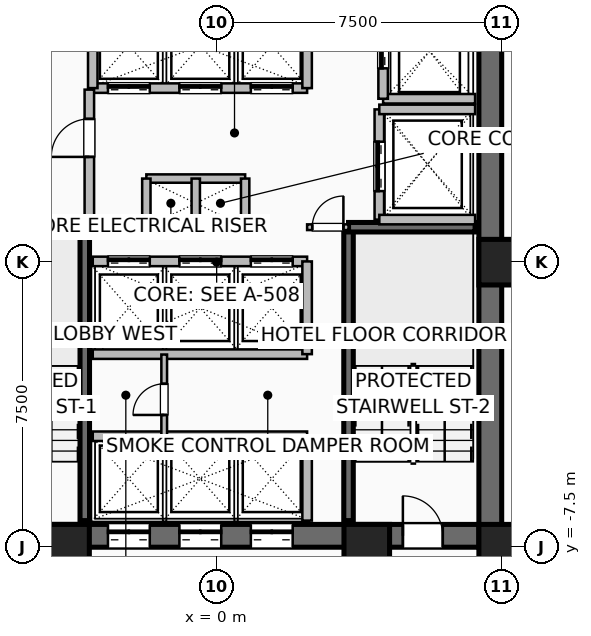
"""IFC4 building model, lengths in metres.
Left out: names, types, materials, properties, quantities, classifications, styles, units other than length and angle.
Written with IfcOpenShell. Run it as: python <this file> out.ifc"""

import sys

from ifc_helpers import new_model, si_unit, direction, frame, frame_2d, origin, origin_2d, place, context, subcontext, project, spatial, rectangle, hollow_rectangle, extrude, element, fill, save


model = new_model("IFC4")
c1 = context("Model", 3, precision=1e-05, world=origin(), true_north=direction((0.0, 1.0)))
c2 = subcontext(c1, "Body", "Model", "MODEL_VIEW")
j1 = project(units=[si_unit("LENGTHUNIT", "METRE"), si_unit("PLANEANGLEUNIT", "RADIAN")], contexts=[c1])
p1 = place(None, origin())
s1 = spatial("IfcSite", under=j1, at=p1, CompositionType="ELEMENT")
p2 = place(p1, origin())
s2 = spatial("IfcBuilding", under=s1, at=p2, CompositionType="ELEMENT")
p3 = place(p2, frame((0.0, 0.0, 27.0)))
s3 = spatial("IfcBuildingStorey", under=s2, at=p3, CompositionType="ELEMENT", Elevation=27.0)
for number, where, z_axis, x_axis in (
    (1, (-3.95, -7.5, 0.0), (0.0, 0.0, 1.0), (1.0, 0.0, 0.0)),
    (2, (3.95, -7.5, 0.0), (0.0, 0.0, 1.0), (1.0, 0.0, 0.0)),
    (3, (7.5, -7.5, 0.0), (0.0, 0.0, 1.0), (1.0, 0.0, 0.0)),
    (4, (7.5, 0.0, 0.0), (0.0, 0.0, 1.0), (1.0, 0.0, 0.0)),
):
    element("IfcColumn", number, at=place(p3, frame(where, z_axis=z_axis, x_axis=x_axis)), inside=s3, PredefinedType="COLUMN", context=c2, shape_type="SweptSolid", body=[
        extrude(hollow_rectangle(XDim=1.2, YDim=1.2, WallThickness=0.055, at=origin_2d()), origin(), (0.0, 0.0, 1.0), 3.5),
    ])
p4 = place(p3, frame((-7.5, -7.2, 0.0), z_axis=(0.0, 0.0, 1.0), x_axis=(1.0, 0.0, 0.0)))
e5 = element("IfcWall", 5, at=p4, inside=s3, PredefinedType="SHEAR", context=c2, shape_type="SweptSolid", body=[
    extrude(rectangle(XDim=15.0, YDim=0.6, at=frame_2d((7.5, 0.0))), origin(), (0.0, 0.0, 1.0), 3.25),
])
p5 = place(p4, frame((1.55, 0.0, 0.0)))
e6 = element("IfcOpeningElement", 6, at=p5, cuts=e5, PredefinedType="OPENING", context=c2, shape_type="SweptSolid", body=[
    extrude(rectangle(XDim=1.05, YDim=2.08, at=frame_2d((0.525, 1.04))), frame((0.0, 0.31, 0.0), z_axis=(0.0, -1.0, 0.0), x_axis=(1.0, 0.0, 0.0)), (0.0, 0.0, 1.0), 0.62),
])
p6 = place(p4, frame((12.4, 0.0, 0.0)))
e7 = element("IfcOpeningElement", 7, at=p6, cuts=e5, PredefinedType="OPENING", context=c2, shape_type="SweptSolid", body=[
    extrude(rectangle(XDim=1.05, YDim=2.08, at=frame_2d((0.525, 1.04))), frame((0.0, 0.31, 0.0), z_axis=(0.0, -1.0, 0.0), x_axis=(1.0, 0.0, 0.0)), (0.0, 0.0, 1.0), 0.62),
])
p7 = place(p4, frame((4.64, 0.0, 0.0)))
e8 = element("IfcOpeningElement", 8, at=p7, cuts=e5, PredefinedType="OPENING", context=c2, shape_type="SweptSolid", body=[
    extrude(rectangle(XDim=1.1, YDim=2.2, at=frame_2d((0.55, 1.1))), frame((0.0, 0.31, 0.0), z_axis=(0.0, -1.0, 0.0), x_axis=(1.0, 0.0, 0.0)), (0.0, 0.0, 1.0), 0.62),
])
p8 = place(p4, frame((6.52, 0.0, 0.0)))
e9 = element("IfcOpeningElement", 9, at=p8, cuts=e5, PredefinedType="OPENING", context=c2, shape_type="SweptSolid", body=[
    extrude(rectangle(XDim=1.1, YDim=2.2, at=frame_2d((0.55, 1.1))), frame((0.0, 0.31, 0.0), z_axis=(0.0, -1.0, 0.0), x_axis=(1.0, 0.0, 0.0)), (0.0, 0.0, 1.0), 0.62),
])
p9 = place(p4, frame((8.4, 0.0, 0.0)))
e10 = element("IfcOpeningElement", 10, at=p9, cuts=e5, PredefinedType="OPENING", context=c2, shape_type="SweptSolid", body=[
    extrude(rectangle(XDim=1.1, YDim=2.2, at=frame_2d((0.55, 1.1))), frame((0.0, 0.31, 0.0), z_axis=(0.0, -1.0, 0.0), x_axis=(1.0, 0.0, 0.0)), (0.0, 0.0, 1.0), 0.62),
])
p10 = place(p3, frame((7.2, -7.5, 0.0), z_axis=(0.0, 0.0, 1.0), x_axis=(0.0, 1.0, 0.0)))
e11 = element("IfcWall", 11, at=p10, inside=s3, PredefinedType="SHEAR", context=c2, shape_type="SweptSolid", body=[
    extrude(rectangle(XDim=15.0, YDim=0.6, at=frame_2d((7.5, 0.0))), origin(), (0.0, 0.0, 1.0), 3.25),
])
p11 = place(p3, frame((-3.47, -6.8, 0.0), z_axis=(0.0, 0.0, 1.0), x_axis=(0.0, 1.0, 0.0)))
e12 = element("IfcWall", 12, at=p11, inside=s3, PredefinedType="SHEAR", context=c2, shape_type="SweptSolid", body=[
    extrude(rectangle(XDim=7.72, YDim=0.25, at=frame_2d((3.86, 0.0))), origin(), (0.0, 0.0, 1.0), 3.25),
])
p12 = place(p3, frame((-6.8, 0.92, 0.0), z_axis=(0.0, 0.0, 1.0), x_axis=(1.0, 0.0, 0.0)))
e13 = element("IfcWall", 13, at=p12, inside=s3, PredefinedType="SHEAR", context=c2, shape_type="SweptSolid", body=[
    extrude(rectangle(XDim=3.33, YDim=0.25, at=frame_2d((1.665, 0.0))), origin(), (0.0, 0.0, 1.0), 3.25),
])
p13 = place(p3, frame((3.47, -6.8, 0.0), z_axis=(0.0, 0.0, 1.0), x_axis=(0.0, 1.0, 0.0)))
e14 = element("IfcWall", 14, at=p13, inside=s3, PredefinedType="SHEAR", context=c2, shape_type="SweptSolid", body=[
    extrude(rectangle(XDim=7.72, YDim=0.25, at=frame_2d((3.86, 0.0))), origin(), (0.0, 0.0, 1.0), 3.25),
])
p14 = place(p3, frame((3.47, 0.92, 0.0), z_axis=(0.0, 0.0, 1.0), x_axis=(1.0, 0.0, 0.0)))
e15 = element("IfcWall", 15, at=p14, inside=s3, PredefinedType="SHEAR", context=c2, shape_type="SweptSolid", body=[
    extrude(rectangle(XDim=3.33, YDim=0.25, at=frame_2d((1.665, 0.0))), origin(), (0.0, 0.0, 1.0), 3.25),
])
for number, where, z_axis, x_axis in (
    (16, (-1.85, 2.2, 0.0), (0.0, 0.0, 1.0), (1.0, 0.0, 0.0)),
    (17, (-1.85, 0.9, 0.0), (0.0, 0.0, 1.0), (1.0, 0.0, 0.0)),
):
    element("IfcWall", number, at=place(p3, frame(where, z_axis=z_axis, x_axis=x_axis)), inside=s3, PredefinedType="PARTITIONING", context=c2, shape_type="SweptSolid", body=[
        extrude(rectangle(XDim=2.6, YDim=0.22, at=frame_2d((1.3, 0.0))), origin(), (0.0, 0.0, 1.0), 3.25),
    ])
for number, where, z_axis, x_axis in (
    (18, (-0.55, 0.9, 0.0), (0.0, 0.0, 1.0), (0.0, 1.0, 0.0)),
    (19, (0.75, 0.9, 0.0), (0.0, 0.0, 1.0), (0.0, 1.0, 0.0)),
    (20, (-1.85, 0.9, 0.0), (0.0, 0.0, 1.0), (0.0, 1.0, 0.0)),
):
    element("IfcWall", number, at=place(p3, frame(where, z_axis=z_axis, x_axis=x_axis)), inside=s3, PredefinedType="PARTITIONING", context=c2, shape_type="SweptSolid", body=[
        extrude(rectangle(XDim=1.3, YDim=0.22, at=frame_2d((0.65, 0.0))), origin(), (0.0, 0.0, 1.0), 3.25),
    ])
p15 = place(p3, frame((-3.26, -4.58, 0.0), z_axis=(0.0, 0.0, 1.0), x_axis=(1.0, 0.0, 0.0)))
e21 = element("IfcWall", 21, at=p15, inside=s3, PredefinedType="SHEAR", context=c2, shape_type="SweptSolid", body=[
    extrude(rectangle(XDim=5.64, YDim=0.25, at=frame_2d((2.82, 0.0))), origin(), (0.0, 0.0, 1.0), 3.25),
])
p16 = place(p3, frame((2.38, -6.8, 0.0), z_axis=(0.0, 0.0, 1.0), x_axis=(0.0, 1.0, 0.0)))
e22 = element("IfcWall", 22, at=p16, inside=s3, PredefinedType="SHEAR", context=c2, shape_type="SweptSolid", body=[
    extrude(rectangle(XDim=2.22, YDim=0.25, at=frame_2d((1.11, 0.0))), origin(), (0.0, 0.0, 1.0), 3.25),
])
p17 = place(p3, frame((-3.26, 0.02, 0.0), z_axis=(0.0, 0.0, 1.0), x_axis=(1.0, 0.0, 0.0)))
e23 = element("IfcWall", 23, at=p17, inside=s3, PredefinedType="SHEAR", context=c2, shape_type="SweptSolid", body=[
    extrude(rectangle(XDim=5.64, YDim=0.25, at=frame_2d((2.82, 0.0))), origin(), (0.0, 0.0, 1.0), 3.25),
])
p18 = place(p17, frame((0.4, 0.0, 0.0)))
e24 = element("IfcOpeningElement", 24, at=p18, cuts=e23, PredefinedType="OPENING", context=c2, shape_type="SweptSolid", body=[
    extrude(rectangle(XDim=1.1, YDim=2.2, at=frame_2d((0.55, 1.1))), frame((0.0, 0.135, 0.0), z_axis=(0.0, -1.0, 0.0), x_axis=(1.0, 0.0, 0.0)), (0.0, 0.0, 1.0), 0.27),
])
p19 = place(p17, frame((2.28, 0.0, 0.0)))
e25 = element("IfcOpeningElement", 25, at=p19, cuts=e23, PredefinedType="OPENING", context=c2, shape_type="SweptSolid", body=[
    extrude(rectangle(XDim=1.1, YDim=2.2, at=frame_2d((0.55, 1.1))), frame((0.0, 0.135, 0.0), z_axis=(0.0, -1.0, 0.0), x_axis=(1.0, 0.0, 0.0)), (0.0, 0.0, 1.0), 0.27),
])
p20 = place(p17, frame((4.16, 0.0, 0.0)))
e26 = element("IfcOpeningElement", 26, at=p20, cuts=e23, PredefinedType="OPENING", context=c2, shape_type="SweptSolid", body=[
    extrude(rectangle(XDim=1.1, YDim=2.2, at=frame_2d((0.55, 1.1))), frame((0.0, 0.135, 0.0), z_axis=(0.0, -1.0, 0.0), x_axis=(1.0, 0.0, 0.0)), (0.0, 0.0, 1.0), 0.27),
])
p21 = place(p3, frame((-3.26, -2.42, 0.0), z_axis=(0.0, 0.0, 1.0), x_axis=(1.0, 0.0, 0.0)))
e27 = element("IfcWall", 27, at=p21, inside=s3, PredefinedType="SHEAR", context=c2, shape_type="SweptSolid", body=[
    extrude(rectangle(XDim=5.64, YDim=0.25, at=frame_2d((2.82, 0.0))), origin(), (0.0, 0.0, 1.0), 3.25),
])
p22 = place(p3, frame((2.38, -2.42, 0.0), z_axis=(0.0, 0.0, 1.0), x_axis=(0.0, 1.0, 0.0)))
e28 = element("IfcWall", 28, at=p22, inside=s3, PredefinedType="SHEAR", context=c2, shape_type="SweptSolid", body=[
    extrude(rectangle(XDim=2.44, YDim=0.25, at=frame_2d((1.22, 0.0))), origin(), (0.0, 0.0, 1.0), 3.25),
])
p23 = place(p3, frame((-3.26, 4.58, 0.0), z_axis=(0.0, 0.0, 1.0), x_axis=(1.0, 0.0, 0.0)))
e29 = element("IfcWall", 29, at=p23, inside=s3, PredefinedType="SHEAR", context=c2, shape_type="SweptSolid", body=[
    extrude(rectangle(XDim=5.64, YDim=0.25, at=frame_2d((2.82, 0.0))), origin(), (0.0, 0.0, 1.0), 3.25),
])
p24 = place(p23, frame((0.4, 0.0, 0.0)))
e30 = element("IfcOpeningElement", 30, at=p24, cuts=e29, PredefinedType="OPENING", context=c2, shape_type="SweptSolid", body=[
    extrude(rectangle(XDim=1.1, YDim=2.2, at=frame_2d((0.55, 1.1))), frame((0.0, 0.135, 0.0), z_axis=(0.0, -1.0, 0.0), x_axis=(1.0, 0.0, 0.0)), (0.0, 0.0, 1.0), 0.27),
])
p25 = place(p23, frame((2.28, 0.0, 0.0)))
e31 = element("IfcOpeningElement", 31, at=p25, cuts=e29, PredefinedType="OPENING", context=c2, shape_type="SweptSolid", body=[
    extrude(rectangle(XDim=1.1, YDim=2.2, at=frame_2d((0.55, 1.1))), frame((0.0, 0.135, 0.0), z_axis=(0.0, -1.0, 0.0), x_axis=(1.0, 0.0, 0.0)), (0.0, 0.0, 1.0), 0.27),
])
p26 = place(p23, frame((4.16, 0.0, 0.0)))
e32 = element("IfcOpeningElement", 32, at=p26, cuts=e29, PredefinedType="OPENING", context=c2, shape_type="SweptSolid", body=[
    extrude(rectangle(XDim=1.1, YDim=2.2, at=frame_2d((0.55, 1.1))), frame((0.0, 0.135, 0.0), z_axis=(0.0, -1.0, 0.0), x_axis=(1.0, 0.0, 0.0)), (0.0, 0.0, 1.0), 0.27),
])
for number, where, z_axis, x_axis in (
    (33, (-3.26, 4.58, 0.0), (0.0, 0.0, 1.0), (0.0, 1.0, 0.0)),
    (34, (2.38, 4.58, 0.0), (0.0, 0.0, 1.0), (0.0, 1.0, 0.0)),
):
    element("IfcWall", number, at=place(p3, frame(where, z_axis=z_axis, x_axis=x_axis)), inside=s3, PredefinedType="SHEAR", context=c2, shape_type="SweptSolid", body=[
        extrude(rectangle(XDim=2.22, YDim=0.25, at=frame_2d((1.11, 0.0))), origin(), (0.0, 0.0, 1.0), 3.25),
    ])
p27 = place(p3, frame((4.38, 4.3, 0.0), z_axis=(0.0, 0.0, 1.0), x_axis=(1.0, 0.0, 0.0)))
e35 = element("IfcWall", 35, at=p27, inside=s3, PredefinedType="SHEAR", context=c2, shape_type="SweptSolid", body=[
    extrude(rectangle(XDim=2.42, YDim=0.25, at=frame_2d((1.21, 0.0))), origin(), (0.0, 0.0, 1.0), 3.25),
])
p28 = place(p3, frame((4.38, 4.3, 0.0), z_axis=(0.0, 0.0, 1.0), x_axis=(0.0, 1.0, 0.0)))
e36 = element("IfcWall", 36, at=p28, inside=s3, PredefinedType="SHEAR", context=c2, shape_type="SweptSolid", body=[
    extrude(rectangle(XDim=2.5, YDim=0.25, at=frame_2d((1.25, 0.0))), origin(), (0.0, 0.0, 1.0), 3.25),
])
p29 = place(p28, frame((0.8, 0.0, 0.0)))
e37 = element("IfcOpeningElement", 37, at=p29, cuts=e36, PredefinedType="OPENING", context=c2, shape_type="SweptSolid", body=[
    extrude(rectangle(XDim=1.2, YDim=2.2, at=frame_2d((0.6, 1.1))), frame((0.0, 0.135, 0.0), z_axis=(0.0, -1.0, 0.0), x_axis=(1.0, 0.0, 0.0)), (0.0, 0.0, 1.0), 0.27),
])
p30 = place(p3, frame((4.28, 1.12, 0.0), z_axis=(0.0, 0.0, 1.0), x_axis=(0.0, 1.0, 0.0)))
e38 = element("IfcWall", 38, at=p30, inside=s3, PredefinedType="SHEAR", context=c2, shape_type="SweptSolid", body=[
    extrude(rectangle(XDim=2.9, YDim=0.25, at=frame_2d((1.45, 0.0))), origin(), (0.0, 0.0, 1.0), 3.25),
])
p31 = place(p30, frame((0.75, 0.0, 0.0)))
e39 = element("IfcOpeningElement", 39, at=p31, cuts=e38, PredefinedType="OPENING", context=c2, shape_type="SweptSolid", body=[
    extrude(rectangle(XDim=1.3, YDim=2.3, at=frame_2d((0.65, 1.15))), frame((0.0, 0.135, 0.0), z_axis=(0.0, -1.0, 0.0), x_axis=(1.0, 0.0, 0.0)), (0.0, 0.0, 1.0), 0.27),
])
for number, where, z_axis, x_axis in (
    (40, (4.28, 1.12, 0.0), (0.0, 0.0, 1.0), (1.0, 0.0, 0.0)),
    (41, (4.28, 4.02, 0.0), (0.0, 0.0, 1.0), (1.0, 0.0, 0.0)),
):
    element("IfcWall", number, at=place(p3, frame(where, z_axis=z_axis, x_axis=x_axis)), inside=s3, PredefinedType="SHEAR", context=c2, shape_type="SweptSolid", body=[
        extrude(rectangle(XDim=2.52, YDim=0.25, at=frame_2d((1.26, 0.0))), origin(), (0.0, 0.0, 1.0), 3.25),
    ])
p32 = place(p3, frame((-3.35, 0.92, 0.0), z_axis=(0.0, 0.0, 1.0), x_axis=(0.0, 1.0, 0.0)))
e42 = element("IfcWall", 42, at=p32, inside=s3, PredefinedType="SHEAR", context=c2, shape_type="SweptSolid", body=[
    extrude(rectangle(XDim=3.62, YDim=0.25, at=frame_2d((1.81, 0.0))), origin(), (0.0, 0.0, 1.0), 3.25),
])
p33 = place(p32, frame((1.85, 0.0, 0.0)))
e43 = element("IfcOpeningElement", 43, at=p33, cuts=e42, PredefinedType="OPENING", context=c2, shape_type="SweptSolid", body=[
    extrude(rectangle(XDim=1.0, YDim=2.08, at=frame_2d((0.5, 1.04))), frame((0.0, 0.135, 0.0), z_axis=(0.0, -1.0, 0.0), x_axis=(1.0, 0.0, 0.0)), (0.0, 0.0, 1.0), 0.27),
])
p34 = place(p3, frame((2.38, 0.92, 0.0), z_axis=(0.0, 0.0, 1.0), x_axis=(1.0, 0.0, 0.0)))
e44 = element("IfcWall", 44, at=p34, inside=s3, PredefinedType="PARTITIONING", context=c2, shape_type="SweptSolid", body=[
    extrude(rectangle(XDim=1.09, YDim=0.15, at=frame_2d((0.545, 0.0))), origin(), (0.0, 0.0, 1.0), 3.25),
])
p35 = place(p34, frame((0.135, 0.0, 0.0)))
e45 = element("IfcOpeningElement", 45, at=p35, cuts=e44, PredefinedType="OPENING", context=c2, shape_type="SweptSolid", body=[
    extrude(rectangle(XDim=0.82, YDim=2.05, at=frame_2d((0.41, 1.025))), frame((0.0, 0.085, 0.0), z_axis=(0.0, -1.0, 0.0), x_axis=(1.0, 0.0, 0.0)), (0.0, 0.0, 1.0), 0.17),
])
p36 = place(p3, frame((-1.38, -4.57, 0.0), z_axis=(0.0, 0.0, 1.0), x_axis=(0.0, 1.0, 0.0)))
e46 = element("IfcWall", 46, at=p36, inside=s3, PredefinedType="PARTITIONING", context=c2, shape_type="SweptSolid", body=[
    extrude(rectangle(XDim=2.14, YDim=0.15, at=frame_2d((1.07, 0.0))), origin(), (0.0, 0.0, 1.0), 3.25),
])
p37 = place(p36, frame((0.55, 0.0, 0.0)))
e47 = element("IfcOpeningElement", 47, at=p37, cuts=e46, PredefinedType="OPENING", context=c2, shape_type="SweptSolid", body=[
    extrude(rectangle(XDim=0.82, YDim=2.05, at=frame_2d((0.41, 1.025))), frame((0.0, 0.085, 0.0), z_axis=(0.0, -1.0, 0.0), x_axis=(1.0, 0.0, 0.0)), (0.0, 0.0, 1.0), 0.17),
])
p38 = place(p6, origin())
e48 = element("IfcDoor", 48, at=p38, inside=s3, OperationType="SINGLE_SWING_LEFT", PredefinedType="DOOR", context=c2, shape_type="SweptSolid", body=[
    extrude(rectangle(XDim=1.05, YDim=2.08, at=frame_2d((0.525, 1.04))), frame((0.0, 0.025, 0.0), z_axis=(0.0, -1.0, 0.0), x_axis=(1.0, 0.0, 0.0)), (0.0, 0.0, 1.0), 0.05),
])
fill(e7, e48)
p39 = place(p7, origin())
e49 = element("IfcDoor", 49, at=p39, inside=s3, OperationType="DOUBLE_DOOR_SLIDING", PredefinedType="DOOR", context=c2, shape_type="SweptSolid", body=[
    extrude(rectangle(XDim=1.1, YDim=2.2, at=frame_2d((0.55, 1.1))), frame((0.0, 0.025, 0.0), z_axis=(0.0, -1.0, 0.0), x_axis=(1.0, 0.0, 0.0)), (0.0, 0.0, 1.0), 0.05),
])
fill(e8, e49)
p40 = place(p8, origin())
e50 = element("IfcDoor", 50, at=p40, inside=s3, OperationType="DOUBLE_DOOR_SLIDING", PredefinedType="DOOR", context=c2, shape_type="SweptSolid", body=[
    extrude(rectangle(XDim=1.1, YDim=2.2, at=frame_2d((0.55, 1.1))), frame((0.0, 0.025, 0.0), z_axis=(0.0, -1.0, 0.0), x_axis=(1.0, 0.0, 0.0)), (0.0, 0.0, 1.0), 0.05),
])
fill(e9, e50)
p41 = place(p9, origin())
e51 = element("IfcDoor", 51, at=p41, inside=s3, OperationType="DOUBLE_DOOR_SLIDING", PredefinedType="DOOR", context=c2, shape_type="SweptSolid", body=[
    extrude(rectangle(XDim=1.1, YDim=2.2, at=frame_2d((0.55, 1.1))), frame((0.0, 0.025, 0.0), z_axis=(0.0, -1.0, 0.0), x_axis=(1.0, 0.0, 0.0)), (0.0, 0.0, 1.0), 0.05),
])
fill(e10, e51)
p42 = place(p18, origin())
e52 = element("IfcDoor", 52, at=p42, inside=s3, OperationType="DOUBLE_DOOR_SLIDING", PredefinedType="DOOR", context=c2, shape_type="SweptSolid", body=[
    extrude(rectangle(XDim=1.1, YDim=2.2, at=frame_2d((0.55, 1.1))), frame((0.0, 0.025, 0.0), z_axis=(0.0, -1.0, 0.0), x_axis=(1.0, 0.0, 0.0)), (0.0, 0.0, 1.0), 0.05),
])
fill(e24, e52)
p43 = place(p19, origin())
e53 = element("IfcDoor", 53, at=p43, inside=s3, OperationType="DOUBLE_DOOR_SLIDING", PredefinedType="DOOR", context=c2, shape_type="SweptSolid", body=[
    extrude(rectangle(XDim=1.1, YDim=2.2, at=frame_2d((0.55, 1.1))), frame((0.0, 0.025, 0.0), z_axis=(0.0, -1.0, 0.0), x_axis=(1.0, 0.0, 0.0)), (0.0, 0.0, 1.0), 0.05),
])
fill(e25, e53)
p44 = place(p20, origin())
e54 = element("IfcDoor", 54, at=p44, inside=s3, OperationType="DOUBLE_DOOR_SLIDING", PredefinedType="DOOR", context=c2, shape_type="SweptSolid", body=[
    extrude(rectangle(XDim=1.1, YDim=2.2, at=frame_2d((0.55, 1.1))), frame((0.0, 0.025, 0.0), z_axis=(0.0, -1.0, 0.0), x_axis=(1.0, 0.0, 0.0)), (0.0, 0.0, 1.0), 0.05),
])
fill(e26, e54)
p45 = place(p24, origin())
e55 = element("IfcDoor", 55, at=p45, inside=s3, OperationType="DOUBLE_DOOR_SLIDING", PredefinedType="DOOR", context=c2, shape_type="SweptSolid", body=[
    extrude(rectangle(XDim=1.1, YDim=2.2, at=frame_2d((0.55, 1.1))), frame((0.0, 0.025, 0.0), z_axis=(0.0, -1.0, 0.0), x_axis=(1.0, 0.0, 0.0)), (0.0, 0.0, 1.0), 0.05),
])
fill(e30, e55)
p46 = place(p25, origin())
e56 = element("IfcDoor", 56, at=p46, inside=s3, OperationType="DOUBLE_DOOR_SLIDING", PredefinedType="DOOR", context=c2, shape_type="SweptSolid", body=[
    extrude(rectangle(XDim=1.1, YDim=2.2, at=frame_2d((0.55, 1.1))), frame((0.0, 0.025, 0.0), z_axis=(0.0, -1.0, 0.0), x_axis=(1.0, 0.0, 0.0)), (0.0, 0.0, 1.0), 0.05),
])
fill(e31, e56)
p47 = place(p26, origin())
e57 = element("IfcDoor", 57, at=p47, inside=s3, OperationType="DOUBLE_DOOR_SLIDING", PredefinedType="DOOR", context=c2, shape_type="SweptSolid", body=[
    extrude(rectangle(XDim=1.1, YDim=2.2, at=frame_2d((0.55, 1.1))), frame((0.0, 0.025, 0.0), z_axis=(0.0, -1.0, 0.0), x_axis=(1.0, 0.0, 0.0)), (0.0, 0.0, 1.0), 0.05),
])
fill(e32, e57)
p48 = place(p29, origin())
e58 = element("IfcDoor", 58, at=p48, inside=s3, OperationType="DOUBLE_DOOR_SLIDING", PredefinedType="DOOR", context=c2, shape_type="SweptSolid", body=[
    extrude(rectangle(XDim=1.2, YDim=2.2, at=frame_2d((0.6, 1.1))), frame((0.0, 0.025, 0.0), z_axis=(0.0, -1.0, 0.0), x_axis=(1.0, 0.0, 0.0)), (0.0, 0.0, 1.0), 0.05),
])
fill(e37, e58)
p49 = place(p31, origin())
e59 = element("IfcDoor", 59, at=p49, inside=s3, OperationType="DOUBLE_DOOR_SLIDING", PredefinedType="DOOR", context=c2, shape_type="SweptSolid", body=[
    extrude(rectangle(XDim=1.3, YDim=2.3, at=frame_2d((0.65, 1.15))), frame((0.0, 0.025, 0.0), z_axis=(0.0, -1.0, 0.0), x_axis=(1.0, 0.0, 0.0)), (0.0, 0.0, 1.0), 0.05),
])
fill(e39, e59)
p50 = place(p33, origin())
e60 = element("IfcDoor", 60, at=p50, inside=s3, OperationType="SINGLE_SWING_LEFT", PredefinedType="DOOR", context=c2, shape_type="SweptSolid", body=[
    extrude(rectangle(XDim=1.0, YDim=2.08, at=frame_2d((0.5, 1.04))), frame((0.0, 0.025, 0.0), z_axis=(0.0, -1.0, 0.0), x_axis=(1.0, 0.0, 0.0)), (0.0, 0.0, 1.0), 0.05),
])
fill(e43, e60)
p51 = place(p35, origin())
e61 = element("IfcDoor", 61, at=p51, inside=s3, OperationType="SINGLE_SWING_RIGHT", PredefinedType="DOOR", context=c2, shape_type="SweptSolid", body=[
    extrude(rectangle(XDim=0.82, YDim=2.05, at=frame_2d((0.41, 1.025))), frame((0.0, 0.025, 0.0), z_axis=(0.0, -1.0, 0.0), x_axis=(1.0, 0.0, 0.0)), (0.0, 0.0, 1.0), 0.05),
])
fill(e45, e61)
p52 = place(p37, origin())
e62 = element("IfcDoor", 62, at=p52, inside=s3, OperationType="SINGLE_SWING_LEFT", PredefinedType="DOOR", context=c2, shape_type="SweptSolid", body=[
    extrude(rectangle(XDim=0.82, YDim=2.05, at=frame_2d((0.41, 1.025))), frame((0.0, 0.025, 0.0), z_axis=(0.0, -1.0, 0.0), x_axis=(1.0, 0.0, 0.0)), (0.0, 0.0, 1.0), 0.05),
])
fill(e47, e62)
save(model, sys.argv[1])
